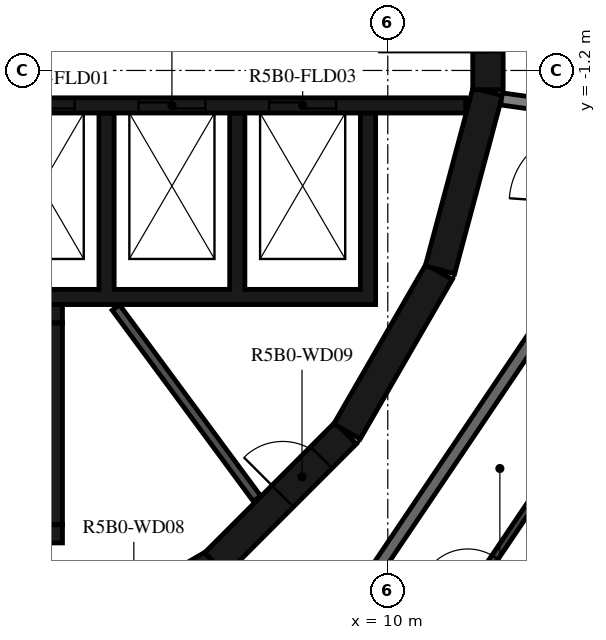
"""IFC4 building model, lengths in metres.
Left out: names, types, materials, properties, quantities, classifications, styles, units other than length and angle.
Written with IfcOpenShell. Run it as: python <this file> out.ifc"""

import sys

from ifc_helpers import new_model, si_unit, direction, frame, frame_2d, origin, place, context, subcontext, project, spatial, polyline, rectangle, outline, extrude, element, fill, save


model = new_model("IFC4")
c1 = context("Model", 3, precision=1e-05, world=origin(), true_north=direction((0.0, 1.0)))
c2 = subcontext(c1, "Body", "Model", "MODEL_VIEW")
j1 = project(units=[si_unit("LENGTHUNIT", "METRE"), si_unit("PLANEANGLEUNIT", "RADIAN")], contexts=[c1])
p1 = place(None, origin())
s1 = spatial("IfcSite", under=j1, at=p1, CompositionType="ELEMENT")
p2 = place(p1, origin())
s2 = spatial("IfcBuilding", under=s1, at=p2, CompositionType="ELEMENT")
p3 = place(p2, frame((0.0, 0.0, 202.4)))
s3 = spatial("IfcBuildingStorey", under=s2, at=p3, CompositionType="ELEMENT", Elevation=202.4)
p4 = place(p3, frame((4.51, -10.845, 0.0), z_axis=(0.0, 0.0, 1.0), x_axis=(0.865975092491, 0.500087131594, 0.0)))
e1 = element("IfcWall", 1, at=p4, inside=s3, PredefinedType="SHEAR", context=c2, shape_type="SweptSolid", body=[
    extrude(rectangle(XDim=3.033, YDim=0.5, at=frame_2d((1.516, 0.0))), origin(), (0.0, 0.0, 1.0), 3.12),
])
p5 = place(p4, frame((1.066, 0.0, 0.0)))
e2 = element("IfcOpeningElement", 2, at=p5, cuts=e1, PredefinedType="OPENING", context=c2, shape_type="SweptSolid", body=[
    extrude(rectangle(XDim=0.9, YDim=2.1, at=frame_2d((0.45, 1.05))), frame((0.0, 0.26, 0.0), z_axis=(0.0, -1.0, 0.0), x_axis=(1.0, 0.0, 0.0)), (0.0, 0.0, 1.0), 0.52),
])
p6 = place(p3, frame((7.164, -9.308, 0.0), z_axis=(0.0, 0.0, 1.0), x_axis=(0.707106781187, 0.707106781187, 0.0)))
e3 = element("IfcWall", 3, at=p6, inside=s3, PredefinedType="SHEAR", context=c2, shape_type="SweptSolid", body=[
    extrude(rectangle(XDim=3.032, YDim=0.5, at=frame_2d((1.516, 0.0))), origin(), (0.0, 0.0, 1.0), 3.12),
])
p7 = place(p6, frame((1.566, 0.0, 0.0)))
e4 = element("IfcOpeningElement", 4, at=p7, cuts=e3, PredefinedType="OPENING", context=c2, shape_type="SweptSolid", body=[
    extrude(rectangle(XDim=0.9, YDim=2.1, at=frame_2d((0.45, 1.05))), frame((0.0, 0.26, 0.0), z_axis=(0.0, -1.0, 0.0), x_axis=(1.0, 0.0, 0.0)), (0.0, 0.0, 1.0), 0.52),
])
for number, where, z_axis, x_axis in (
    (5, (9.329, -7.137, 0.0), (0.0, 0.0, 1.0), (0.5, 0.866, 0.0)),
    (6, (10.858, -4.479, 0.0), (0.0, 0.0, 1.0), (0.259, 0.966, 0.0)),
):
    element("IfcWall", number, at=place(p3, frame(where, z_axis=z_axis, x_axis=x_axis)), inside=s3, PredefinedType="SHEAR", context=c2, shape_type="SweptSolid", body=[
        extrude(rectangle(XDim=3.033, YDim=0.5, at=frame_2d((1.516, 0.0))), origin(), (0.0, 0.0, 1.0), 3.12),
    ])
p8 = place(p3, frame((11.647, -1.516, 0.0), z_axis=(0.0, 0.0, 1.0), x_axis=(0.0, 1.0, 0.0)))
e7 = element("IfcWall", 7, at=p8, inside=s3, PredefinedType="SHEAR", context=c2, shape_type="SweptSolid", body=[
    extrude(rectangle(XDim=3.033, YDim=0.5, at=frame_2d((1.516, 0.0))), origin(), (0.0, 0.0, 1.0), 3.12),
])
p9 = place(p8, frame((0.616, 0.0, 0.0)))
e8 = element("IfcOpeningElement", 8, at=p9, cuts=e7, PredefinedType="OPENING", context=c2, shape_type="SweptSolid", body=[
    extrude(rectangle(XDim=1.8, YDim=2.1, at=frame_2d((0.9, 1.05))), frame((0.0, 0.26, 0.0), z_axis=(0.0, -1.0, 0.0), x_axis=(1.0, 0.0, 0.0)), (0.0, 0.0, 1.0), 0.52),
])
p10 = place(p3, frame((-2.4, -5.2, 0.0), z_axis=(0.0, 0.0, 1.0), x_axis=(1.0, 0.0, 0.0)))
e9 = element("IfcWall", 9, at=p10, inside=s3, PredefinedType="SHEAR", context=c2, shape_type="SweptSolid", body=[
    extrude(rectangle(XDim=7.05, YDim=0.3, at=frame_2d((3.525, 0.0))), origin(), (0.0, 0.0, 1.0), 3.12),
])
p11 = place(p3, frame((4.5, -8.67, 0.0), z_axis=(0.0, 0.0, 1.0), x_axis=(0.0, 1.0, 0.0)))
e10 = element("IfcWall", 10, at=p11, inside=s3, PredefinedType="SHEAR", context=c2, shape_type="SweptSolid", body=[
    extrude(rectangle(XDim=3.32, YDim=0.3, at=frame_2d((1.66, 0.0))), origin(), (0.0, 0.0, 1.0), 3.12),
])
p12 = place(p3, frame((0.1, -8.82, 0.0), z_axis=(0.0, 0.0, 1.0), x_axis=(1.0, 0.0, 0.0)))
e11 = element("IfcWall", 11, at=p12, inside=s3, PredefinedType="SHEAR", context=c2, shape_type="SweptSolid", body=[
    extrude(rectangle(XDim=4.55, YDim=0.3, at=frame_2d((2.275, 0.0))), origin(), (0.0, 0.0, 1.0), 3.12),
])
p13 = place(p3, origin())
e12 = element("IfcWall", 12, at=p13, inside=s3, PredefinedType="SHEAR", context=c2, shape_type="SweptSolid", body=[
    extrude(outline(polyline([(9.8, -5.05), (9.8, -4.8), (9.8, -1.9), (9.55, -1.9), (9.55, -4.8), (7.65, -4.8), (7.65, -1.9), (7.4, -1.9), (7.4, -4.8), (5.5, -4.8), (5.5, -1.9), (5.25, -1.9), (5.25, -4.8), (3.35, -4.8), (3.35, -1.9), (3.1, -1.9), (3.1, -4.8), (1.2, -4.8), (1.2, -1.9), (0.95, -1.9), (0.95, -4.8), (-0.95, -4.8), (-0.95, -1.9), (-1.2, -1.9), (-1.2, -4.8), (-3.1, -4.8), (-3.1, -1.9), (-3.35, -1.9), (-3.35, -4.8), (-5.25, -4.8), (-5.25, -1.9), (-5.5, -1.9), (-5.5, -4.8), (-7.4, -4.8), (-7.4, -1.9), (-7.65, -1.9), (-7.65, -4.8), (-9.55, -4.8), (-9.55, -1.9), (-9.8, -1.9), (-9.8, -4.8), (-9.8, -5.05), (9.8, -5.05)])), origin(), (0.0, 0.0, 1.0), 3.12),
])
p14 = place(p3, frame((3.35, -1.775, 0.0), z_axis=(0.0, 0.0, 1.0), x_axis=(1.0, 0.0, 0.0)))
e13 = element("IfcWall", 13, at=p14, inside=s3, PredefinedType="SHEAR", context=c2, shape_type="SweptSolid", body=[
    extrude(rectangle(XDim=7.93, YDim=0.25, at=frame_2d((3.965, 0.0))), origin(), (0.0, 0.0, 1.0), 3.12),
])
p15 = place(p14, frame((0.4, 0.0, 0.0)))
e14 = element("IfcOpeningElement", 14, at=p15, cuts=e13, PredefinedType="OPENING", context=c2, shape_type="SweptSolid", body=[
    extrude(rectangle(XDim=1.1, YDim=2.4, at=frame_2d((0.55, 1.2))), frame((0.0, 0.135, 0.0), z_axis=(0.0, -1.0, 0.0), x_axis=(1.0, 0.0, 0.0)), (0.0, 0.0, 1.0), 0.27),
])
p16 = place(p14, frame((2.55, 0.0, 0.0)))
e15 = element("IfcOpeningElement", 15, at=p16, cuts=e13, PredefinedType="OPENING", context=c2, shape_type="SweptSolid", body=[
    extrude(rectangle(XDim=1.1, YDim=2.4, at=frame_2d((0.55, 1.2))), frame((0.0, 0.135, 0.0), z_axis=(0.0, -1.0, 0.0), x_axis=(1.0, 0.0, 0.0)), (0.0, 0.0, 1.0), 0.27),
])
p17 = place(p14, frame((4.7, 0.0, 0.0)))
e16 = element("IfcOpeningElement", 16, at=p17, cuts=e13, PredefinedType="OPENING", context=c2, shape_type="SweptSolid", body=[
    extrude(rectangle(XDim=1.1, YDim=2.4, at=frame_2d((0.55, 1.2))), frame((0.0, 0.135, 0.0), z_axis=(0.0, -1.0, 0.0), x_axis=(1.0, 0.0, 0.0)), (0.0, 0.0, 1.0), 0.27),
])
p18 = place(p3, frame((5.528, -5.098, 0.0), z_axis=(0.0, 0.0, 1.0), x_axis=(0.594034318069, -0.804439698769, 0.0)))
e17 = element("IfcWall", 17, at=p18, inside=s3, PredefinedType="PARTITIONING", context=c2, shape_type="SweptSolid", body=[
    extrude(rectangle(XDim=3.907, YDim=0.15, at=frame_2d((1.953, 0.0))), origin(), (0.0, 0.0, 1.0), 3.12),
])
p19 = place(p3, frame((13.302, -1.869, 0.0), z_axis=(0.0, 0.0, 1.0), x_axis=(-0.990274397042, 0.13912806533, 0.0)))
e18 = element("IfcWall", 18, at=p19, inside=s3, PredefinedType="STANDARD", context=c2, shape_type="SweptSolid", body=[
    extrude(rectangle(XDim=1.446, YDim=0.2, at=frame_2d((0.723, 0.0))), origin(), (0.0, 0.0, 1.0), 3.12),
])
p20 = place(p3, frame((9.101, -10.47, 0.0), z_axis=(0.0, 0.0, 1.0), x_axis=(0.559195469534, 0.829035841718, 0.0)))
e19 = element("IfcWall", 19, at=p20, inside=s3, PredefinedType="STANDARD", context=c2, shape_type="SweptSolid", body=[
    extrude(rectangle(XDim=7.181, YDim=0.2, at=frame_2d((3.591, 0.0))), origin(), (0.0, 0.0, 1.0), 3.12),
])
p21 = place(p3, frame((10.12, -11.642, 0.0), z_axis=(0.0, 0.0, 1.0), x_axis=(0.55920080659, 0.829032241779, 0.0)))
e20 = element("IfcWall", 20, at=p21, inside=s3, PredefinedType="PARTITIONING", context=c2, shape_type="SweptSolid", body=[
    extrude(rectangle(XDim=7.985, YDim=0.12, at=frame_2d((3.992, 0.0))), origin(), (0.0, 0.0, 1.0), 3.12),
])
p22 = place(p21, frame((2.138, 0.0, 0.0)))
e21 = element("IfcOpeningElement", 21, at=p22, cuts=e20, PredefinedType="OPENING", context=c2, shape_type="SweptSolid", body=[
    extrude(rectangle(XDim=0.8, YDim=2.1, at=frame_2d((0.4, 1.05))), frame((0.0, 0.07, 0.0), z_axis=(0.0, -1.0, 0.0), x_axis=(1.0, 0.0, 0.0)), (0.0, 0.0, 1.0), 0.14),
])
p23 = place(p3, frame((22.052, -5.467, 0.0), z_axis=(0.0, 0.0, 1.0), x_axis=(-0.898796865831, -0.438365365846, 0.0)))
e22 = element("IfcWall", 22, at=p23, inside=s3, PredefinedType="PARTITIONING", context=c2, shape_type="SweptSolid", body=[
    extrude(rectangle(XDim=12.879, YDim=0.12, at=frame_2d((6.439, 0.0))), origin(), (0.0, 0.0, 1.0), 3.12),
])
p24 = place(p9, origin())
e23 = element("IfcDoor", 23, at=p24, inside=s3, OperationType="DOUBLE_DOOR_SINGLE_SWING", PredefinedType="DOOR", context=c2, shape_type="SweptSolid", body=[
    extrude(rectangle(XDim=1.8, YDim=2.1, at=frame_2d((0.9, 1.05))), frame((0.0, 0.025, 0.0), z_axis=(0.0, -1.0, 0.0), x_axis=(1.0, 0.0, 0.0)), (0.0, 0.0, 1.0), 0.05),
])
fill(e8, e23)
p25 = place(p15, origin())
e24 = element("IfcDoor", 24, at=p25, inside=s3, OperationType="DOUBLE_DOOR_SLIDING", PredefinedType="DOOR", context=c2, shape_type="SweptSolid", body=[
    extrude(rectangle(XDim=1.1, YDim=2.4, at=frame_2d((0.55, 1.2))), frame((0.0, 0.025, 0.0), z_axis=(0.0, -1.0, 0.0), x_axis=(1.0, 0.0, 0.0)), (0.0, 0.0, 1.0), 0.05),
])
fill(e14, e24)
p26 = place(p16, origin())
e25 = element("IfcDoor", 25, at=p26, inside=s3, OperationType="DOUBLE_DOOR_SLIDING", PredefinedType="DOOR", context=c2, shape_type="SweptSolid", body=[
    extrude(rectangle(XDim=1.1, YDim=2.4, at=frame_2d((0.55, 1.2))), frame((0.0, 0.025, 0.0), z_axis=(0.0, -1.0, 0.0), x_axis=(1.0, 0.0, 0.0)), (0.0, 0.0, 1.0), 0.05),
])
fill(e15, e25)
p27 = place(p17, origin())
e26 = element("IfcDoor", 26, at=p27, inside=s3, OperationType="DOUBLE_DOOR_SLIDING", PredefinedType="DOOR", context=c2, shape_type="SweptSolid", body=[
    extrude(rectangle(XDim=1.1, YDim=2.4, at=frame_2d((0.55, 1.2))), frame((0.0, 0.025, 0.0), z_axis=(0.0, -1.0, 0.0), x_axis=(1.0, 0.0, 0.0)), (0.0, 0.0, 1.0), 0.05),
])
fill(e16, e26)
p28 = place(p7, origin())
e27 = element("IfcDoor", 27, at=p28, inside=s3, OperationType="SINGLE_SWING_LEFT", PredefinedType="DOOR", context=c2, shape_type="SweptSolid", body=[
    extrude(rectangle(XDim=0.9, YDim=2.1, at=frame_2d((0.45, 1.05))), frame((0.0, 0.025, 0.0), z_axis=(0.0, -1.0, 0.0), x_axis=(1.0, 0.0, 0.0)), (0.0, 0.0, 1.0), 0.05),
])
fill(e4, e27)
p29 = place(p22, origin())
e28 = element("IfcDoor", 28, at=p29, inside=s3, OperationType="SINGLE_SWING_RIGHT", PredefinedType="DOOR", context=c2, shape_type="SweptSolid", body=[
    extrude(rectangle(XDim=0.8, YDim=2.1, at=frame_2d((0.4, 1.05))), frame((0.0, 0.025, 0.0), z_axis=(0.0, -1.0, 0.0), x_axis=(1.0, 0.0, 0.0)), (0.0, 0.0, 1.0), 0.05),
])
fill(e21, e28)
save(model, sys.argv[1])
